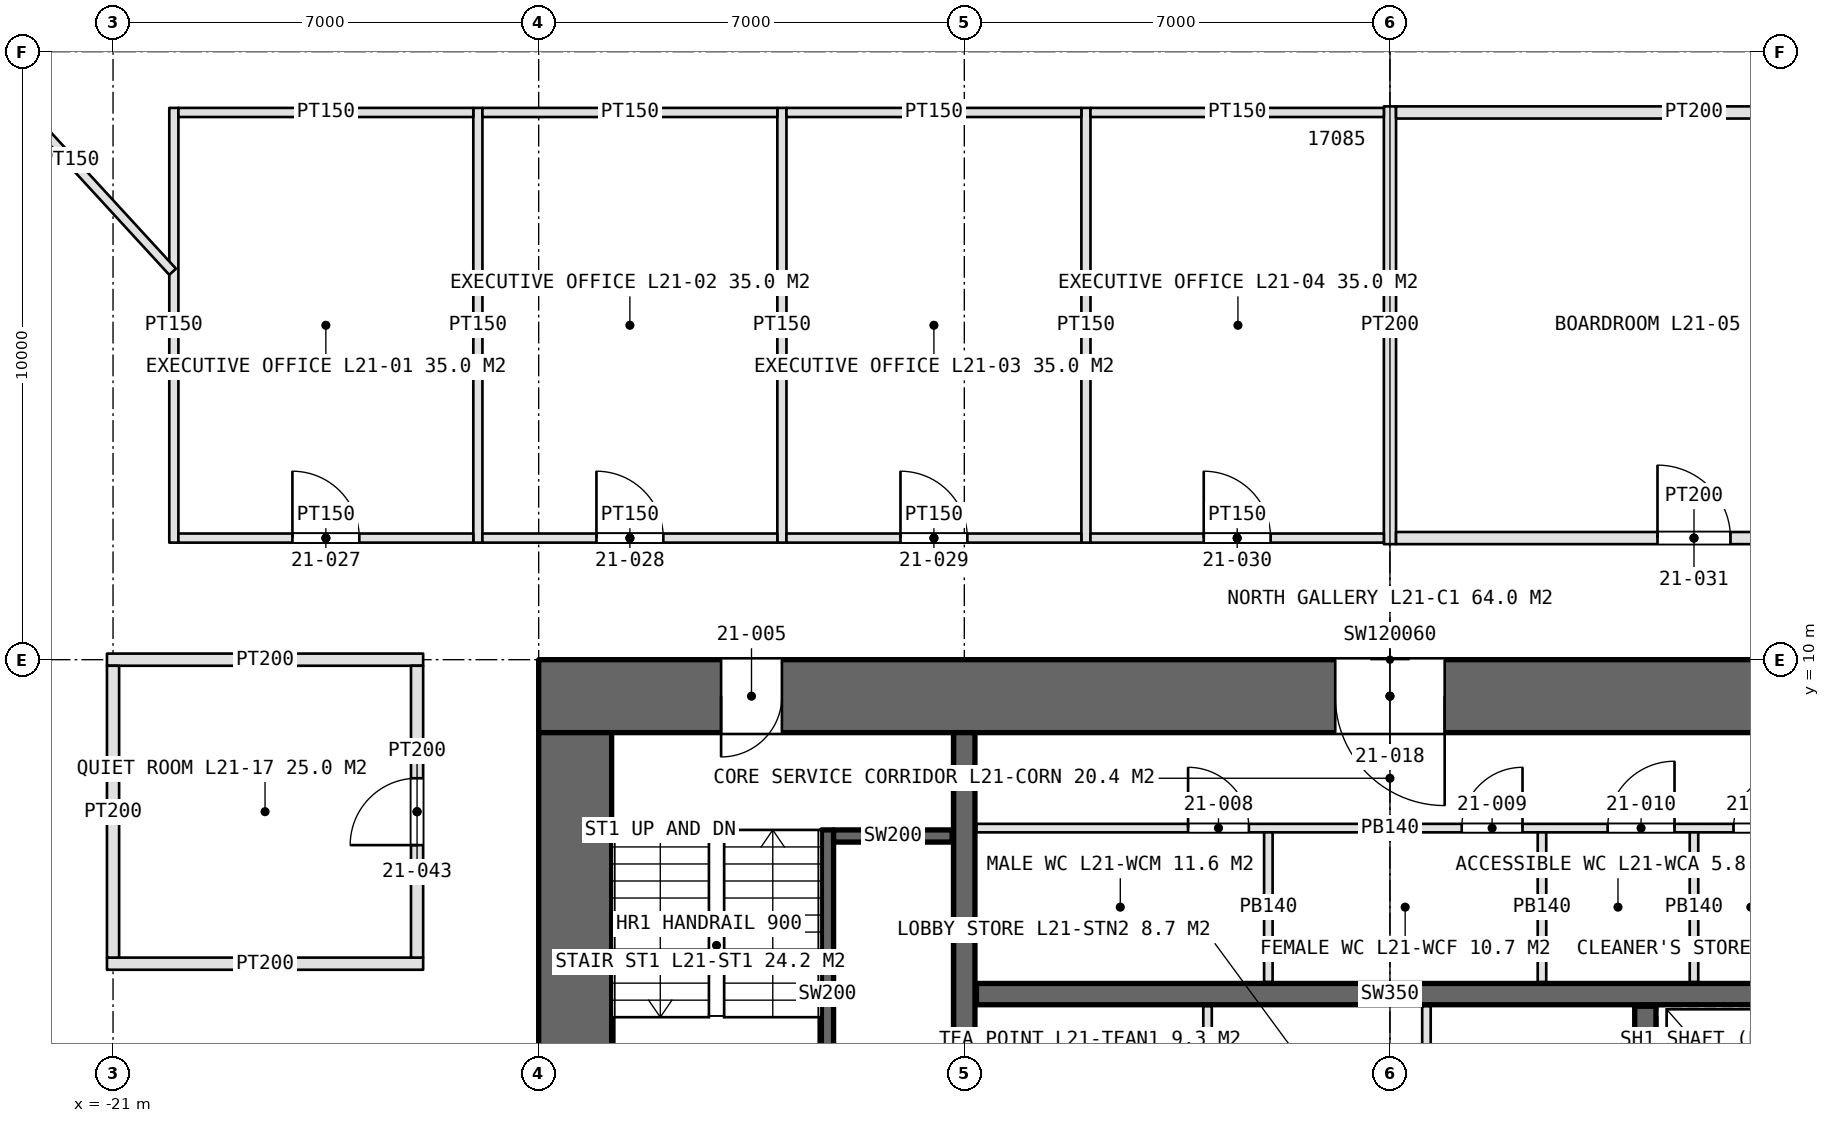
"""IFC4 building model, lengths in metres.
Left out: names, types, materials, properties, quantities, classifications, styles, units other than length and angle.
Written with IfcOpenShell. Run it as: python <this file> out.ifc"""

import sys

from ifc_helpers import new_model, si_unit, direction, frame, frame_2d, origin, place, context, subcontext, project, spatial, rectangle, extrude, element, fill, save


model = new_model("IFC4")
c1 = context("Model", 3, precision=1e-05, world=origin(), true_north=direction((0.0, 1.0)))
c2 = subcontext(c1, "Body", "Model", "MODEL_VIEW")
j1 = project(units=[si_unit("LENGTHUNIT", "METRE"), si_unit("PLANEANGLEUNIT", "RADIAN")], contexts=[c1])
p1 = place(None, origin())
s1 = spatial("IfcSite", under=j1, at=p1, CompositionType="ELEMENT")
p2 = place(p1, origin())
s2 = spatial("IfcBuilding", under=s1, at=p2, CompositionType="ELEMENT")
p3 = place(p2, frame((0.0, 0.0, 105.0)))
s3 = spatial("IfcBuildingStorey", under=s2, at=p3, CompositionType="ELEMENT", Elevation=105.0)
p4 = place(p3, frame((14.0, 9.4, 0.0), z_axis=(0.0, 0.0, 1.0), x_axis=(-1.0, 0.0, 0.0)))
e1 = element("IfcWall", 1, at=p4, inside=s3, PredefinedType="SHEAR", context=c2, shape_type="SweptSolid", body=[
    extrude(rectangle(XDim=28.0, YDim=1.2, at=frame_2d((14.0, 0.0))), origin(), (0.0, 0.0, 1.0), 4.2),
])
p5 = place(p4, frame((24.0, 0.0, 0.0)))
e2 = element("IfcOpeningElement", 2, at=p5, cuts=e1, PredefinedType="OPENING", context=c2, shape_type="SweptSolid", body=[
    extrude(rectangle(XDim=1.0, YDim=2.4, at=frame_2d((0.5, 1.2))), frame((0.0, 0.61, 0.0), z_axis=(0.0, -1.0, 0.0), x_axis=(1.0, 0.0, 0.0)), (0.0, 0.0, 1.0), 1.22),
])
p6 = place(p4, frame((13.1, 0.0, 0.0)))
e3 = element("IfcOpeningElement", 3, at=p6, cuts=e1, PredefinedType="OPENING", context=c2, shape_type="SweptSolid", body=[
    extrude(rectangle(XDim=1.8, YDim=2.4, at=frame_2d((0.9, 1.2))), frame((0.0, 0.61, 0.0), z_axis=(0.0, -1.0, 0.0), x_axis=(1.0, 0.0, 0.0)), (0.0, 0.0, 1.0), 1.22),
])
p7 = place(p3, frame((-13.4, 8.8, 0.0), z_axis=(0.0, 0.0, 1.0), x_axis=(0.0, -1.0, 0.0)))
e4 = element("IfcWall", 4, at=p7, inside=s3, PredefinedType="SHEAR", context=c2, shape_type="SweptSolid", body=[
    extrude(rectangle(XDim=17.6, YDim=1.2, at=frame_2d((8.8, 0.0))), origin(), (0.0, 0.0, 1.0), 4.2),
])
p8 = place(p7, frame((7.9, 0.0, 0.0)))
e5 = element("IfcOpeningElement", 5, at=p8, cuts=e4, PredefinedType="OPENING", context=c2, shape_type="SweptSolid", body=[
    extrude(rectangle(XDim=1.8, YDim=2.4, at=frame_2d((0.9, 1.2))), frame((0.0, 0.61, 0.0), z_axis=(0.0, -1.0, 0.0), x_axis=(1.0, 0.0, 0.0)), (0.0, 0.0, 1.0), 1.22),
])
p9 = place(p7, frame((16.5, 0.0, 0.0)))
e6 = element("IfcOpeningElement", 6, at=p9, cuts=e4, PredefinedType="OPENING", context=c2, shape_type="SweptSolid", body=[
    extrude(rectangle(XDim=1.0, YDim=2.4, at=frame_2d((0.5, 1.2))), frame((0.0, 0.61, 0.0), z_axis=(0.0, -1.0, 0.0), x_axis=(1.0, 0.0, 0.0)), (0.0, 0.0, 1.0), 1.22),
])
p10 = place(p3, frame((-7.0, -8.8, 0.0), z_axis=(0.0, 0.0, 1.0), x_axis=(0.0, 1.0, 0.0)))
e7 = element("IfcWall", 7, at=p10, inside=s3, PredefinedType="SHEAR", context=c2, shape_type="SweptSolid", body=[
    extrude(rectangle(XDim=17.6, YDim=0.35, at=frame_2d((8.8, 0.0))), origin(), (0.0, 0.0, 1.0), 4.2),
])
p11 = place(p10, frame((7.9, 0.0, 0.0)))
e8 = element("IfcOpeningElement", 8, at=p11, cuts=e7, PredefinedType="OPENING", context=c2, shape_type="SweptSolid", body=[
    extrude(rectangle(XDim=1.8, YDim=2.4, at=frame_2d((0.9, 1.2))), frame((0.0, 0.185, 0.0), z_axis=(0.0, -1.0, 0.0), x_axis=(1.0, 0.0, 0.0)), (0.0, 0.0, 1.0), 0.37),
])
p12 = place(p3, frame((-6.8, 4.5, 0.0), z_axis=(0.0, 0.0, 1.0), x_axis=(1.0, 0.0, 0.0)))
e9 = element("IfcWall", 9, at=p12, inside=s3, PredefinedType="SHEAR", context=c2, shape_type="SweptSolid", body=[
    extrude(rectangle(XDim=13.6, YDim=0.35, at=frame_2d((6.8, 0.0))), origin(), (0.0, 0.0, 1.0), 4.2),
])
p13 = place(p3, frame((4.2, 1.8, 0.0), z_axis=(0.0, 0.0, 1.0), x_axis=(0.0, 1.0, 0.0)))
e10 = element("IfcWall", 10, at=p13, inside=s3, PredefinedType="SHEAR", context=c2, shape_type="SweptSolid", body=[
    extrude(rectangle(XDim=2.5, YDim=0.35, at=frame_2d((1.25, 0.0))), origin(), (0.0, 0.0, 1.0), 4.2),
])
p14 = place(p3, frame((-6.8, 7.23, 0.0), z_axis=(0.0, 0.0, 1.0), x_axis=(1.0, 0.0, 0.0)))
e11 = element("IfcWall", 11, at=p14, inside=s3, PredefinedType="PARTITIONING", context=c2, shape_type="SweptSolid", body=[
    extrude(rectangle(XDim=13.6, YDim=0.14, at=frame_2d((6.8, 0.0))), origin(), (0.0, 0.0, 1.0), 3.95),
])
p15 = place(p14, frame((3.48, 0.0, 0.0)))
e12 = element("IfcOpeningElement", 12, at=p15, cuts=e11, PredefinedType="OPENING", context=c2, shape_type="SweptSolid", body=[
    extrude(rectangle(XDim=1.0, YDim=2.4, at=frame_2d((0.5, 1.2))), frame((0.0, 0.08, 0.0), z_axis=(0.0, -1.0, 0.0), x_axis=(1.0, 0.0, 0.0)), (0.0, 0.0, 1.0), 0.16),
])
p16 = place(p14, frame((7.98, 0.0, 0.0)))
e13 = element("IfcOpeningElement", 13, at=p16, cuts=e11, PredefinedType="OPENING", context=c2, shape_type="SweptSolid", body=[
    extrude(rectangle(XDim=1.0, YDim=2.4, at=frame_2d((0.5, 1.2))), frame((0.0, 0.08, 0.0), z_axis=(0.0, -1.0, 0.0), x_axis=(1.0, 0.0, 0.0)), (0.0, 0.0, 1.0), 0.16),
])
p17 = place(p14, frame((10.38, 0.0, 0.0)))
e14 = element("IfcOpeningElement", 14, at=p17, cuts=e11, PredefinedType="OPENING", context=c2, shape_type="SweptSolid", body=[
    extrude(rectangle(XDim=1.1, YDim=2.4, at=frame_2d((0.55, 1.2))), frame((0.0, 0.08, 0.0), z_axis=(0.0, -1.0, 0.0), x_axis=(1.0, 0.0, 0.0)), (0.0, 0.0, 1.0), 0.16),
])
p18 = place(p14, frame((12.45, 0.0, 0.0)))
e15 = element("IfcOpeningElement", 15, at=p18, cuts=e11, PredefinedType="OPENING", context=c2, shape_type="SweptSolid", body=[
    extrude(rectangle(XDim=0.9, YDim=2.4, at=frame_2d((0.45, 1.2))), frame((0.0, 0.08, 0.0), z_axis=(0.0, -1.0, 0.0), x_axis=(1.0, 0.0, 0.0)), (0.0, 0.0, 1.0), 0.16),
])
for number, where, z_axis, x_axis in (
    (16, (-2.0, 4.7, 0.0), (0.0, 0.0, 1.0), (0.0, 1.0, 0.0)),
    (17, (2.5, 4.7, 0.0), (0.0, 0.0, 1.0), (0.0, 1.0, 0.0)),
    (18, (5.0, 4.7, 0.0), (0.0, 0.0, 1.0), (0.0, 1.0, 0.0)),
):
    element("IfcWall", number, at=place(p3, frame(where, z_axis=z_axis, x_axis=x_axis)), inside=s3, PredefinedType="PARTITIONING", context=c2, shape_type="SweptSolid", body=[
        extrude(rectangle(XDim=2.46, YDim=0.14, at=frame_2d((1.23, 0.0))), origin(), (0.0, 0.0, 1.0), 3.95),
    ])
for number, where, z_axis, x_axis in (
    (19, (-3.0, 1.8, 0.0), (0.0, 0.0, 1.0), (0.0, 1.0, 0.0)),
    (20, (0.6, 1.8, 0.0), (0.0, 0.0, 1.0), (0.0, 1.0, 0.0)),
):
    element("IfcWall", number, at=place(p3, frame(where, z_axis=z_axis, x_axis=x_axis)), inside=s3, PredefinedType="PARTITIONING", context=c2, shape_type="SweptSolid", body=[
        extrude(rectangle(XDim=2.5, YDim=0.14, at=frame_2d((1.25, 0.0))), origin(), (0.0, 0.0, 1.0), 3.95),
    ])
p19 = place(p3, frame((-9.25, 7.2, 0.0), z_axis=(0.0, 0.0, 1.0), x_axis=(0.0, -1.0, 0.0)))
e21 = element("IfcWall", 21, at=p19, inside=s3, PredefinedType="SOLIDWALL", context=c2, shape_type="SweptSolid", body=[
    extrude(rectangle(XDim=5.4, YDim=0.2, at=frame_2d((2.7, 0.0))), origin(), (0.0, 0.0, 1.0), 4.2),
])
p20 = place(p3, frame((-9.15, 7.1, 0.0), z_axis=(0.0, 0.0, 1.0), x_axis=(1.0, 0.0, 0.0)))
e22 = element("IfcWall", 22, at=p20, inside=s3, PredefinedType="SOLIDWALL", context=c2, shape_type="SweptSolid", body=[
    extrude(rectangle(XDim=1.95, YDim=0.2, at=frame_2d((0.975, 0.0))), origin(), (0.0, 0.0, 1.0), 4.2),
])
for number, where, z_axis, x_axis in (
    (23, (-20.0, 11.925, 0.0), (0.0, 0.0, 1.0), (0.0, 1.0, 0.0)),
    (24, (-15.0, 11.925, 0.0), (0.0, 0.0, 1.0), (0.0, 1.0, 0.0)),
    (25, (-10.0, 11.925, 0.0), (0.0, 0.0, 1.0), (0.0, 1.0, 0.0)),
    (26, (-5.0, 11.925, 0.0), (0.0, 0.0, 1.0), (0.0, 1.0, 0.0)),
):
    element("IfcWall", number, at=place(p3, frame(where, z_axis=z_axis, x_axis=x_axis)), inside=s3, PredefinedType="PARTITIONING", context=c2, shape_type="SweptSolid", body=[
        extrude(rectangle(XDim=7.15, YDim=0.15, at=frame_2d((3.575, 0.0))), origin(), (0.0, 0.0, 1.0), 3.0),
    ])
p21 = place(p3, frame((0.0, 11.9, 0.0), z_axis=(0.0, 0.0, 1.0), x_axis=(0.0, 1.0, 0.0)))
e27 = element("IfcWall", 27, at=p21, inside=s3, PredefinedType="PARTITIONING", context=c2, shape_type="SweptSolid", body=[
    extrude(rectangle(XDim=7.2, YDim=0.2, at=frame_2d((3.6, 0.0))), origin(), (0.0, 0.0, 1.0), 3.0),
])
p22 = place(p3, frame((-19.925, 12.0, 0.0), z_axis=(0.0, 0.0, 1.0), x_axis=(1.0, 0.0, 0.0)))
e28 = element("IfcWall", 28, at=p22, inside=s3, PredefinedType="PARTITIONING", context=c2, shape_type="SweptSolid", body=[
    extrude(rectangle(XDim=4.85, YDim=0.15, at=frame_2d((2.425, 0.0))), origin(), (0.0, 0.0, 1.0), 3.0),
])
p23 = place(p22, frame((1.875, 0.0, 0.0)))
e29 = element("IfcOpeningElement", 29, at=p23, cuts=e28, PredefinedType="OPENING", context=c2, shape_type="SweptSolid", body=[
    extrude(rectangle(XDim=1.1, YDim=2.3, at=frame_2d((0.55, 1.15))), frame((0.0, 0.085, 0.0), z_axis=(0.0, -1.0, 0.0), x_axis=(1.0, 0.0, 0.0)), (0.0, 0.0, 1.0), 0.17),
])
p24 = place(p3, frame((-19.925, 19.0, 0.0), z_axis=(0.0, 0.0, 1.0), x_axis=(1.0, 0.0, 0.0)))
e30 = element("IfcWall", 30, at=p24, inside=s3, PredefinedType="PARTITIONING", context=c2, shape_type="SweptSolid", body=[
    extrude(rectangle(XDim=4.85, YDim=0.15, at=frame_2d((2.425, 0.0))), origin(), (0.0, 0.0, 1.0), 3.0),
])
p25 = place(p3, frame((-14.925, 12.0, 0.0), z_axis=(0.0, 0.0, 1.0), x_axis=(1.0, 0.0, 0.0)))
e31 = element("IfcWall", 31, at=p25, inside=s3, PredefinedType="PARTITIONING", context=c2, shape_type="SweptSolid", body=[
    extrude(rectangle(XDim=4.85, YDim=0.15, at=frame_2d((2.425, 0.0))), origin(), (0.0, 0.0, 1.0), 3.0),
])
p26 = place(p25, frame((1.875, 0.0, 0.0)))
e32 = element("IfcOpeningElement", 32, at=p26, cuts=e31, PredefinedType="OPENING", context=c2, shape_type="SweptSolid", body=[
    extrude(rectangle(XDim=1.1, YDim=2.3, at=frame_2d((0.55, 1.15))), frame((0.0, 0.085, 0.0), z_axis=(0.0, -1.0, 0.0), x_axis=(1.0, 0.0, 0.0)), (0.0, 0.0, 1.0), 0.17),
])
p27 = place(p3, frame((-14.925, 19.0, 0.0), z_axis=(0.0, 0.0, 1.0), x_axis=(1.0, 0.0, 0.0)))
e33 = element("IfcWall", 33, at=p27, inside=s3, PredefinedType="PARTITIONING", context=c2, shape_type="SweptSolid", body=[
    extrude(rectangle(XDim=4.85, YDim=0.15, at=frame_2d((2.425, 0.0))), origin(), (0.0, 0.0, 1.0), 3.0),
])
p28 = place(p3, frame((-9.925, 12.0, 0.0), z_axis=(0.0, 0.0, 1.0), x_axis=(1.0, 0.0, 0.0)))
e34 = element("IfcWall", 34, at=p28, inside=s3, PredefinedType="PARTITIONING", context=c2, shape_type="SweptSolid", body=[
    extrude(rectangle(XDim=4.85, YDim=0.15, at=frame_2d((2.425, 0.0))), origin(), (0.0, 0.0, 1.0), 3.0),
])
p29 = place(p28, frame((1.875, 0.0, 0.0)))
e35 = element("IfcOpeningElement", 35, at=p29, cuts=e34, PredefinedType="OPENING", context=c2, shape_type="SweptSolid", body=[
    extrude(rectangle(XDim=1.1, YDim=2.3, at=frame_2d((0.55, 1.15))), frame((0.0, 0.085, 0.0), z_axis=(0.0, -1.0, 0.0), x_axis=(1.0, 0.0, 0.0)), (0.0, 0.0, 1.0), 0.17),
])
p30 = place(p3, frame((-9.925, 19.0, 0.0), z_axis=(0.0, 0.0, 1.0), x_axis=(1.0, 0.0, 0.0)))
e36 = element("IfcWall", 36, at=p30, inside=s3, PredefinedType="PARTITIONING", context=c2, shape_type="SweptSolid", body=[
    extrude(rectangle(XDim=4.85, YDim=0.15, at=frame_2d((2.425, 0.0))), origin(), (0.0, 0.0, 1.0), 3.0),
])
p31 = place(p3, frame((-4.925, 12.0, 0.0), z_axis=(0.0, 0.0, 1.0), x_axis=(1.0, 0.0, 0.0)))
e37 = element("IfcWall", 37, at=p31, inside=s3, PredefinedType="PARTITIONING", context=c2, shape_type="SweptSolid", body=[
    extrude(rectangle(XDim=4.825, YDim=0.15, at=frame_2d((2.413, 0.0))), origin(), (0.0, 0.0, 1.0), 3.0),
])
p32 = place(p31, frame((1.863, 0.0, 0.0)))
e38 = element("IfcOpeningElement", 38, at=p32, cuts=e37, PredefinedType="OPENING", context=c2, shape_type="SweptSolid", body=[
    extrude(rectangle(XDim=1.1, YDim=2.3, at=frame_2d((0.55, 1.15))), frame((0.0, 0.085, 0.0), z_axis=(0.0, -1.0, 0.0), x_axis=(1.0, 0.0, 0.0)), (0.0, 0.0, 1.0), 0.17),
])
p33 = place(p3, frame((-4.925, 19.0, 0.0), z_axis=(0.0, 0.0, 1.0), x_axis=(1.0, 0.0, 0.0)))
e39 = element("IfcWall", 39, at=p33, inside=s3, PredefinedType="PARTITIONING", context=c2, shape_type="SweptSolid", body=[
    extrude(rectangle(XDim=4.825, YDim=0.15, at=frame_2d((2.413, 0.0))), origin(), (0.0, 0.0, 1.0), 3.0),
])
p34 = place(p3, frame((0.1, 12.0, 0.0), z_axis=(0.0, 0.0, 1.0), x_axis=(1.0, 0.0, 0.0)))
e40 = element("IfcWall", 40, at=p34, inside=s3, PredefinedType="PARTITIONING", context=c2, shape_type="SweptSolid", body=[
    extrude(rectangle(XDim=9.8, YDim=0.2, at=frame_2d((4.9, 0.0))), origin(), (0.0, 0.0, 1.0), 3.0),
])
p35 = place(p34, frame((4.3, 0.0, 0.0)))
e41 = element("IfcOpeningElement", 41, at=p35, cuts=e40, PredefinedType="OPENING", context=c2, shape_type="SweptSolid", body=[
    extrude(rectangle(XDim=1.2, YDim=2.4, at=frame_2d((0.6, 1.2))), frame((0.0, 0.11, 0.0), z_axis=(0.0, -1.0, 0.0), x_axis=(1.0, 0.0, 0.0)), (0.0, 0.0, 1.0), 0.22),
])
p36 = place(p3, frame((0.1, 19.0, 0.0), z_axis=(0.0, 0.0, 1.0), x_axis=(1.0, 0.0, 0.0)))
e42 = element("IfcWall", 42, at=p36, inside=s3, PredefinedType="PARTITIONING", context=c2, shape_type="SweptSolid", body=[
    extrude(rectangle(XDim=9.8, YDim=0.2, at=frame_2d((4.9, 0.0))), origin(), (0.0, 0.0, 1.0), 3.0),
])
for number, where, z_axis, x_axis in (
    (43, (-15.9, 5.0, 0.0), (0.0, 0.0, 1.0), (-1.0, 0.0, 0.0)),
    (44, (-15.9, 10.0, 0.0), (0.0, 0.0, 1.0), (-1.0, 0.0, 0.0)),
):
    element("IfcWall", number, at=place(p3, frame(where, z_axis=z_axis, x_axis=x_axis)), inside=s3, PredefinedType="PARTITIONING", context=c2, shape_type="SweptSolid", body=[
        extrude(rectangle(XDim=5.2, YDim=0.2, at=frame_2d((2.6, 0.0))), origin(), (0.0, 0.0, 1.0), 3.0),
    ])
p37 = place(p3, frame((-16.0, 5.1, 0.0), z_axis=(0.0, 0.0, 1.0), x_axis=(0.0, 1.0, 0.0)))
e45 = element("IfcWall", 45, at=p37, inside=s3, PredefinedType="PARTITIONING", context=c2, shape_type="SweptSolid", body=[
    extrude(rectangle(XDim=4.8, YDim=0.2, at=frame_2d((2.4, 0.0))), origin(), (0.0, 0.0, 1.0), 3.0),
])
p38 = place(p37, frame((1.85, 0.0, 0.0)))
e46 = element("IfcOpeningElement", 46, at=p38, cuts=e45, PredefinedType="OPENING", context=c2, shape_type="SweptSolid", body=[
    extrude(rectangle(XDim=1.1, YDim=2.3, at=frame_2d((0.55, 1.15))), frame((0.0, 0.11, 0.0), z_axis=(0.0, -1.0, 0.0), x_axis=(1.0, 0.0, 0.0)), (0.0, 0.0, 1.0), 0.22),
])
p39 = place(p3, frame((-21.0, 5.1, 0.0), z_axis=(0.0, 0.0, 1.0), x_axis=(0.0, 1.0, 0.0)))
e47 = element("IfcWall", 47, at=p39, inside=s3, PredefinedType="PARTITIONING", context=c2, shape_type="SweptSolid", body=[
    extrude(rectangle(XDim=4.8, YDim=0.2, at=frame_2d((2.4, 0.0))), origin(), (0.0, 0.0, 1.0), 3.0),
])
p40 = place(p3, frame((-20.02, 16.38, 0.0), z_axis=(0.0, 0.0, 1.0), x_axis=(-0.676159982548, 0.736754828963, 0.0)))
e48 = element("IfcWall", 48, at=p40, inside=s3, PredefinedType="PARTITIONING", context=c2, shape_type="SweptSolid", body=[
    extrude(rectangle(XDim=4.976, YDim=0.15, at=frame_2d((2.488, 0.0))), origin(), (0.0, 0.0, 1.0), 3.0),
])
p41 = place(p5, origin())
e49 = element("IfcDoor", 49, at=p41, inside=s3, OperationType="SINGLE_SWING_RIGHT", PredefinedType="DOOR", context=c2, shape_type="SweptSolid", body=[
    extrude(rectangle(XDim=1.0, YDim=2.4, at=frame_2d((0.5, 1.2))), frame((0.0, 0.025, 0.0), z_axis=(0.0, -1.0, 0.0), x_axis=(1.0, 0.0, 0.0)), (0.0, 0.0, 1.0), 0.05),
])
fill(e2, e49)
p42 = place(p15, origin())
e50 = element("IfcDoor", 50, at=p42, inside=s3, OperationType="SINGLE_SWING_LEFT", PredefinedType="DOOR", context=c2, shape_type="SweptSolid", body=[
    extrude(rectangle(XDim=1.0, YDim=2.4, at=frame_2d((0.5, 1.2))), frame((0.0, 0.025, 0.0), z_axis=(0.0, -1.0, 0.0), x_axis=(1.0, 0.0, 0.0)), (0.0, 0.0, 1.0), 0.05),
])
fill(e12, e50)
p43 = place(p16, origin())
e51 = element("IfcDoor", 51, at=p43, inside=s3, OperationType="SINGLE_SWING_RIGHT", PredefinedType="DOOR", context=c2, shape_type="SweptSolid", body=[
    extrude(rectangle(XDim=1.0, YDim=2.4, at=frame_2d((0.5, 1.2))), frame((0.0, 0.025, 0.0), z_axis=(0.0, -1.0, 0.0), x_axis=(1.0, 0.0, 0.0)), (0.0, 0.0, 1.0), 0.05),
])
fill(e13, e51)
p44 = place(p17, origin())
e52 = element("IfcDoor", 52, at=p44, inside=s3, OperationType="SINGLE_SWING_RIGHT", PredefinedType="DOOR", context=c2, shape_type="SweptSolid", body=[
    extrude(rectangle(XDim=1.1, YDim=2.4, at=frame_2d((0.55, 1.2))), frame((0.0, 0.025, 0.0), z_axis=(0.0, -1.0, 0.0), x_axis=(1.0, 0.0, 0.0)), (0.0, 0.0, 1.0), 0.05),
])
fill(e14, e52)
p45 = place(p18, origin())
e53 = element("IfcDoor", 53, at=p45, inside=s3, OperationType="SINGLE_SWING_RIGHT", PredefinedType="DOOR", context=c2, shape_type="SweptSolid", body=[
    extrude(rectangle(XDim=0.9, YDim=2.4, at=frame_2d((0.45, 1.2))), frame((0.0, 0.025, 0.0), z_axis=(0.0, -1.0, 0.0), x_axis=(1.0, 0.0, 0.0)), (0.0, 0.0, 1.0), 0.05),
])
fill(e15, e53)
p46 = place(p6, origin())
e54 = element("IfcDoor", 54, at=p46, inside=s3, OperationType="DOUBLE_DOOR_SINGLE_SWING", PredefinedType="DOOR", context=c2, shape_type="SweptSolid", body=[
    extrude(rectangle(XDim=1.8, YDim=2.4, at=frame_2d((0.9, 1.2))), frame((0.0, 0.025, 0.0), z_axis=(0.0, -1.0, 0.0), x_axis=(1.0, 0.0, 0.0)), (0.0, 0.0, 1.0), 0.05),
])
fill(e3, e54)
p47 = place(p23, origin())
e55 = element("IfcDoor", 55, at=p47, inside=s3, OperationType="SINGLE_SWING_LEFT", PredefinedType="DOOR", context=c2, shape_type="SweptSolid", body=[
    extrude(rectangle(XDim=1.1, YDim=2.3, at=frame_2d((0.55, 1.15))), frame((0.0, 0.025, 0.0), z_axis=(0.0, -1.0, 0.0), x_axis=(1.0, 0.0, 0.0)), (0.0, 0.0, 1.0), 0.05),
])
fill(e29, e55)
p48 = place(p26, origin())
e56 = element("IfcDoor", 56, at=p48, inside=s3, OperationType="SINGLE_SWING_LEFT", PredefinedType="DOOR", context=c2, shape_type="SweptSolid", body=[
    extrude(rectangle(XDim=1.1, YDim=2.3, at=frame_2d((0.55, 1.15))), frame((0.0, 0.025, 0.0), z_axis=(0.0, -1.0, 0.0), x_axis=(1.0, 0.0, 0.0)), (0.0, 0.0, 1.0), 0.05),
])
fill(e32, e56)
p49 = place(p29, origin())
e57 = element("IfcDoor", 57, at=p49, inside=s3, OperationType="SINGLE_SWING_LEFT", PredefinedType="DOOR", context=c2, shape_type="SweptSolid", body=[
    extrude(rectangle(XDim=1.1, YDim=2.3, at=frame_2d((0.55, 1.15))), frame((0.0, 0.025, 0.0), z_axis=(0.0, -1.0, 0.0), x_axis=(1.0, 0.0, 0.0)), (0.0, 0.0, 1.0), 0.05),
])
fill(e35, e57)
p50 = place(p32, origin())
e58 = element("IfcDoor", 58, at=p50, inside=s3, OperationType="SINGLE_SWING_LEFT", PredefinedType="DOOR", context=c2, shape_type="SweptSolid", body=[
    extrude(rectangle(XDim=1.1, YDim=2.3, at=frame_2d((0.55, 1.15))), frame((0.0, 0.025, 0.0), z_axis=(0.0, -1.0, 0.0), x_axis=(1.0, 0.0, 0.0)), (0.0, 0.0, 1.0), 0.05),
])
fill(e38, e58)
p51 = place(p35, origin())
e59 = element("IfcDoor", 59, at=p51, inside=s3, OperationType="SINGLE_SWING_LEFT", PredefinedType="DOOR", context=c2, shape_type="SweptSolid", body=[
    extrude(rectangle(XDim=1.2, YDim=2.4, at=frame_2d((0.6, 1.2))), frame((0.0, 0.025, 0.0), z_axis=(0.0, -1.0, 0.0), x_axis=(1.0, 0.0, 0.0)), (0.0, 0.0, 1.0), 0.05),
])
fill(e41, e59)
p52 = place(p38, origin())
e60 = element("IfcDoor", 60, at=p52, inside=s3, OperationType="SINGLE_SWING_LEFT", PredefinedType="DOOR", context=c2, shape_type="SweptSolid", body=[
    extrude(rectangle(XDim=1.1, YDim=2.3, at=frame_2d((0.55, 1.15))), frame((0.0, 0.025, 0.0), z_axis=(0.0, -1.0, 0.0), x_axis=(1.0, 0.0, 0.0)), (0.0, 0.0, 1.0), 0.05),
])
fill(e46, e60)
save(model, sys.argv[1])
